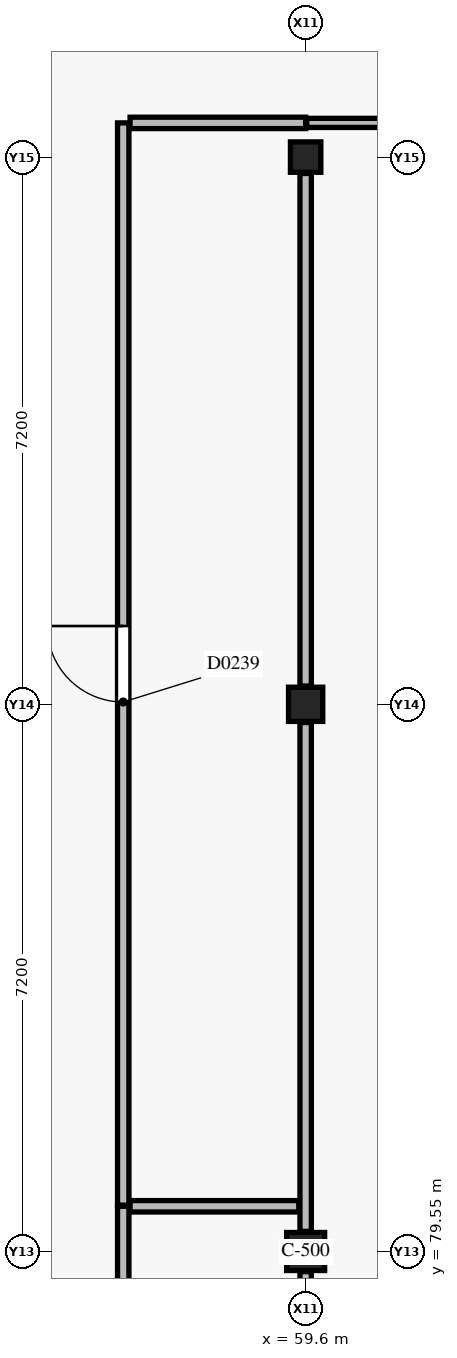
"""IFC4 building model, lengths in metres.
Left out: names, types, materials, properties, quantities, classifications, styles, units other than length and angle.
Written with IfcOpenShell. Run it as: python <this file> out.ifc"""

import sys

from ifc_helpers import new_model, si_unit, direction, frame, frame_2d, origin, origin_2d, place, context, subcontext, project, spatial, rectangle, extrude, element, fill, save


model = new_model("IFC4")
c1 = context("Model", 3, precision=1e-05, world=origin(), true_north=direction((0.0, 1.0)))
c2 = subcontext(c1, "Body", "Model", "MODEL_VIEW")
j1 = project(units=[si_unit("LENGTHUNIT", "METRE"), si_unit("PLANEANGLEUNIT", "RADIAN")], contexts=[c1])
p1 = place(None, origin())
s1 = spatial("IfcSite", under=j1, at=p1, CompositionType="ELEMENT")
p2 = place(p1, origin())
s2 = spatial("IfcBuilding", under=s1, at=p2, CompositionType="ELEMENT")
p3 = place(p2, frame((0.0, 0.0, 9.0)))
s3 = spatial("IfcBuildingStorey", under=s2, at=p3, CompositionType="ELEMENT", Elevation=9.0)
p4 = place(p3, frame((59.6, 79.55, 0.0), z_axis=(0.0, 0.0, 1.0), x_axis=(1.0, 0.0, 0.0)))
e1 = element("IfcColumn", 1, at=p4, inside=s3, PredefinedType="COLUMN", context=c2, shape_type="SweptSolid", body=[
    extrude(rectangle(XDim=0.5, YDim=0.5, at=origin_2d()), origin(), (0.0, 0.0, 1.0), 4.2),
])
p5 = place(p3, frame((59.6, 86.75, 0.0), z_axis=(0.0, 0.0, 1.0), x_axis=(1.0, 0.0, 0.0)))
e2 = element("IfcColumn", 2, at=p5, inside=s3, PredefinedType="COLUMN", context=c2, shape_type="SweptSolid", body=[
    extrude(rectangle(XDim=0.45, YDim=0.45, at=origin_2d()), origin(), (0.0, 0.0, 1.0), 4.2),
])
p6 = place(p3, frame((59.6, 93.95, 0.0), z_axis=(0.0, 0.0, 1.0), x_axis=(1.0, 0.0, 0.0)))
e3 = element("IfcColumn", 3, at=p6, inside=s3, PredefinedType="COLUMN", context=c2, shape_type="SweptSolid", body=[
    extrude(rectangle(XDim=0.4, YDim=0.4, at=origin_2d()), origin(), (0.0, 0.0, 1.0), 4.2),
])
p7 = place(p3, frame((57.2, 70.09, 0.0), z_axis=(0.0, 0.0, 1.0), x_axis=(0.0, 1.0, 0.0)))
e4 = element("IfcWall", 4, at=p7, inside=s3, PredefinedType="PARTITIONING", context=c2, shape_type="SweptSolid", body=[
    extrude(rectangle(XDim=10.055, YDim=0.15, at=frame_2d((5.027, 0.0))), origin(), (0.0, 0.0, 1.0), 3.235),
])
p8 = place(p7, frame((4.452, 0.0, 0.0)))
e5 = element("IfcOpeningElement", 5, at=p8, cuts=e4, PredefinedType="OPENING", context=c2, shape_type="SweptSolid", body=[
    extrude(rectangle(XDim=1.15, YDim=2.15, at=frame_2d((0.575, 1.075))), frame((0.0, 0.085, 0.0), z_axis=(0.0, -1.0, 0.0), x_axis=(1.0, 0.0, 0.0)), (0.0, 0.0, 1.0), 0.17),
])
p9 = place(p3, frame((57.2, 80.16, 0.0), z_axis=(0.0, 0.0, 1.0), x_axis=(0.0, 1.0, 0.0)))
e6 = element("IfcWall", 6, at=p9, inside=s3, PredefinedType="PARTITIONING", context=c2, shape_type="SweptSolid", body=[
    extrude(rectangle(XDim=14.24, YDim=0.15, at=frame_2d((7.12, 0.0))), origin(), (0.0, 0.0, 1.0), 3.215),
])
p10 = place(p9, frame((6.62, 0.0, 0.0)))
e7 = element("IfcOpeningElement", 7, at=p10, cuts=e6, PredefinedType="OPENING", context=c2, shape_type="SweptSolid", body=[
    extrude(rectangle(XDim=1.0, YDim=2.15, at=frame_2d((0.5, 1.075))), frame((0.0, 0.085, 0.0), z_axis=(0.0, -1.0, 0.0), x_axis=(1.0, 0.0, 0.0)), (0.0, 0.0, 1.0), 0.17),
])
p11 = place(p3, frame((57.29, 94.4, 0.0), z_axis=(0.0, 0.0, 1.0), x_axis=(1.0, 0.0, 0.0)))
e8 = element("IfcWall", 8, at=p11, inside=s3, PredefinedType="PARTITIONING", context=c2, shape_type="SweptSolid", body=[
    extrude(rectangle(XDim=2.31, YDim=0.15, at=frame_2d((1.155, 0.0))), origin(), (0.0, 0.0, 1.0), 3.455),
])
p12 = place(p3, frame((59.615, 94.4, 0.0), z_axis=(0.0, 0.0, 1.0), x_axis=(1.0, 0.0, 0.0)))
e9 = element("IfcWall", 9, at=p12, inside=s3, PredefinedType="PARTITIONING", context=c2, shape_type="SweptSolid", body=[
    extrude(rectangle(XDim=7.145, YDim=0.12, at=frame_2d((3.573, 0.0))), origin(), (0.0, 0.0, 1.0), 3.285),
])
p13 = place(p12, frame((3.048, 0.0, 0.0)))
e10 = element("IfcOpeningElement", 10, at=p13, cuts=e9, PredefinedType="OPENING", context=c2, shape_type="SweptSolid", body=[
    extrude(rectangle(XDim=1.05, YDim=2.15, at=frame_2d((0.525, 1.075))), frame((0.0, 0.07, 0.0), z_axis=(0.0, -1.0, 0.0), x_axis=(1.0, 0.0, 0.0)), (0.0, 0.0, 1.0), 0.14),
])
p14 = place(p3, frame((59.6, 72.64, 0.0), z_axis=(0.0, 0.0, 1.0), x_axis=(0.0, 1.0, 0.0)))
e11 = element("IfcWall", 11, at=p14, inside=s3, PredefinedType="PARTITIONING", context=c2, shape_type="SweptSolid", body=[
    extrude(rectangle(XDim=6.645, YDim=0.15, at=frame_2d((3.323, 0.0))), origin(), (0.0, 0.0, 1.0), 3.285),
])
p15 = place(p3, frame((59.6, 79.815, 0.0), z_axis=(0.0, 0.0, 1.0), x_axis=(0.0, 1.0, 0.0)))
e12 = element("IfcWall", 12, at=p15, inside=s3, PredefinedType="PARTITIONING", context=c2, shape_type="SweptSolid", body=[
    extrude(rectangle(XDim=6.695, YDim=0.15, at=frame_2d((3.348, 0.0))), origin(), (0.0, 0.0, 1.0), 3.285),
])
p16 = place(p3, frame((59.6, 86.99, 0.0), z_axis=(0.0, 0.0, 1.0), x_axis=(0.0, 1.0, 0.0)))
e13 = element("IfcWall", 13, at=p16, inside=s3, PredefinedType="PARTITIONING", context=c2, shape_type="SweptSolid", body=[
    extrude(rectangle(XDim=6.745, YDim=0.15, at=frame_2d((3.373, 0.0))), origin(), (0.0, 0.0, 1.0), 3.415),
])
p17 = place(p3, frame((57.29, 80.145, 0.0), z_axis=(0.0, 0.0, 1.0), x_axis=(1.0, 0.0, 0.0)))
e14 = element("IfcWall", 14, at=p17, inside=s3, PredefinedType="PARTITIONING", context=c2, shape_type="SweptSolid", body=[
    extrude(rectangle(XDim=2.22, YDim=0.15, at=frame_2d((1.11, 0.0))), origin(), (0.0, 0.0, 1.0), 3.285),
])
p18 = place(p10, origin())
e15 = element("IfcDoor", 15, at=p18, inside=s3, OperationType="SINGLE_SWING_RIGHT", PredefinedType="DOOR", context=c2, shape_type="SweptSolid", body=[
    extrude(rectangle(XDim=1.0, YDim=2.15, at=frame_2d((0.5, 1.075))), frame((0.0, 0.025, 0.0), z_axis=(0.0, -1.0, 0.0), x_axis=(1.0, 0.0, 0.0)), (0.0, 0.0, 1.0), 0.05),
])
fill(e7, e15)
save(model, sys.argv[1])
